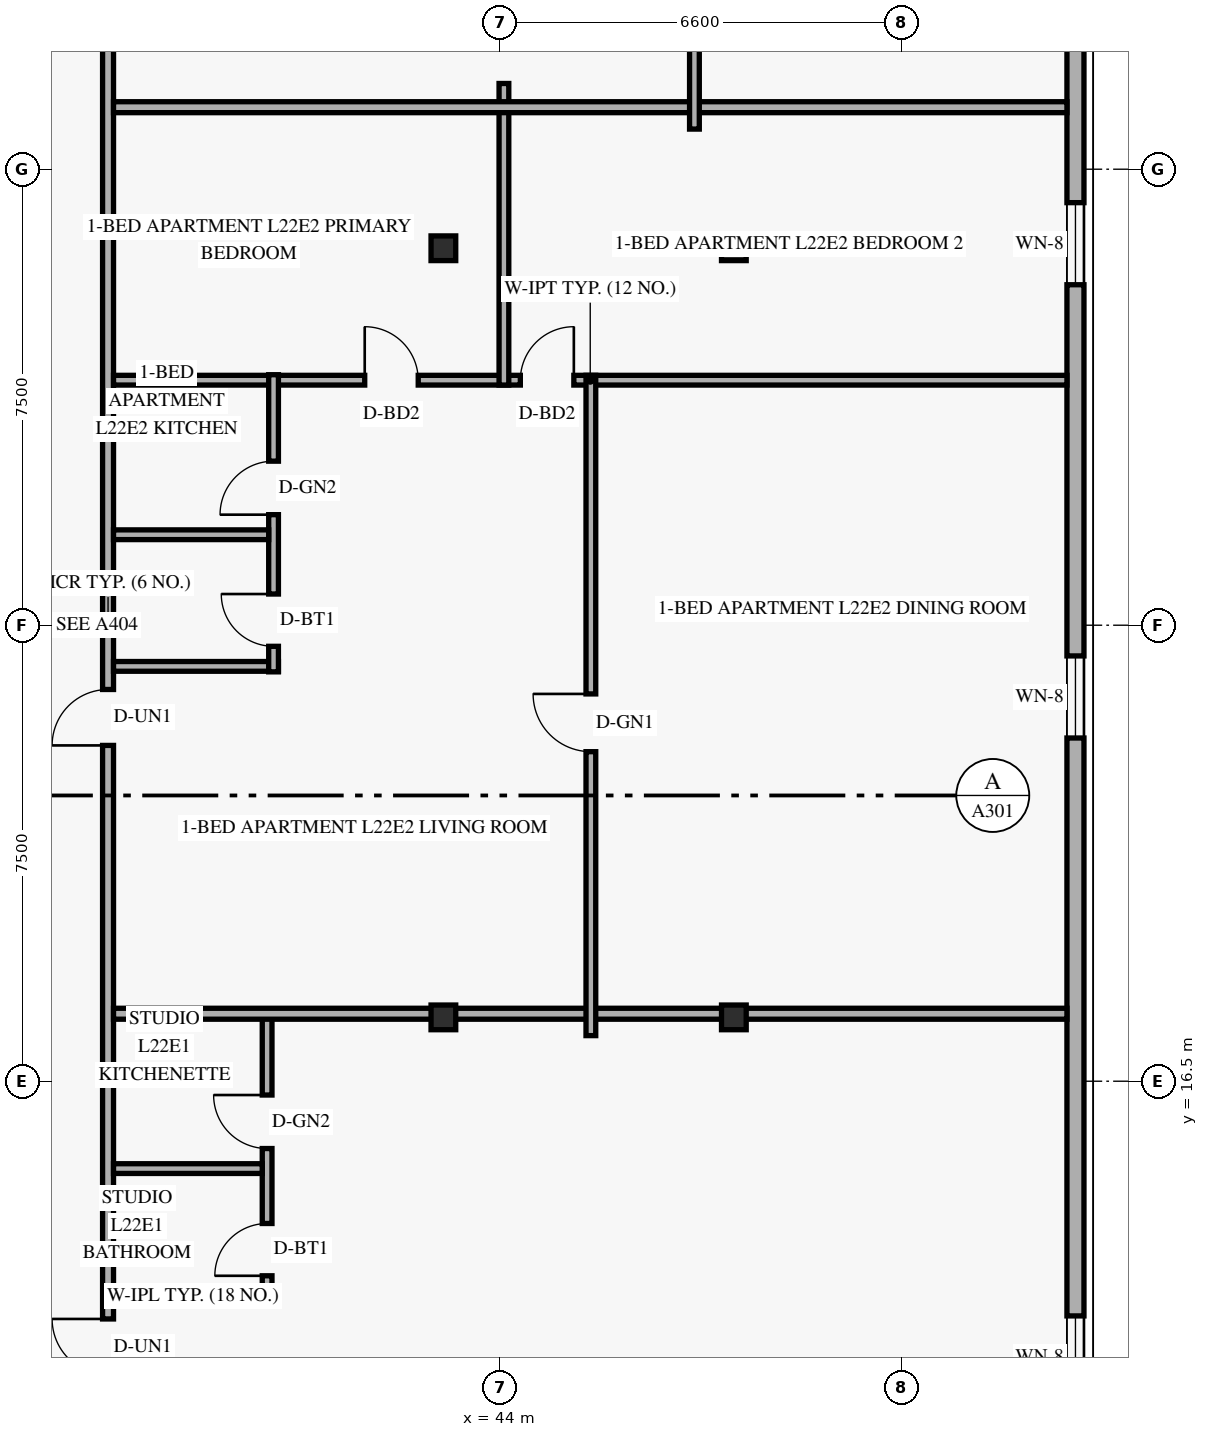
"""IFC4 building model, lengths in metres.
Left out: names, types, materials, properties, quantities, classifications, styles, units other than length and angle.
Written with IfcOpenShell. Run it as: python <this file> out.ifc"""

import sys

from ifc_helpers import new_model, si_unit, direction, frame, frame_2d, origin, origin_2d, place, context, subcontext, project, spatial, rectangle, hollow_rectangle, extrude, element, fill, save


model = new_model("IFC4")
c1 = context("Model", 3, precision=1e-05, world=origin(), true_north=direction((0.0, 1.0)))
c2 = subcontext(c1, "Body", "Model", "MODEL_VIEW")
j1 = project(units=[si_unit("LENGTHUNIT", "METRE"), si_unit("PLANEANGLEUNIT", "RADIAN")], contexts=[c1])
p1 = place(None, origin())
s1 = spatial("IfcSite", under=j1, at=p1, CompositionType="ELEMENT")
p2 = place(p1, origin())
s2 = spatial("IfcBuilding", under=s1, at=p2, CompositionType="ELEMENT")
p3 = place(p2, frame((0.0, 0.0, 87.6)))
s3 = spatial("IfcBuildingStorey", under=s2, at=p3, CompositionType="ELEMENT", Elevation=87.6)
for number, where, z_axis, x_axis in (
    (1, (43.002, 17.55, 0.0), (0.035, 0.0, 0.999), (0.0, 1.0, 0.0)),
    (2, (43.002, 30.2, 0.0), (0.035, 0.0, 0.999), (0.0, 1.0, 0.0)),
):
    element("IfcColumn", number, at=place(p3, frame(where, z_axis=z_axis, x_axis=x_axis)), inside=s3, PredefinedType="COLUMN", context=c2, shape_type="SweptSolid", body=[
        extrude(hollow_rectangle(XDim=0.406, YDim=0.406, WallThickness=0.016, at=origin_2d()), origin(), (0.0, 0.0, 1.0), 3.602),
    ])
for number, where, z_axis, x_axis in (
    (3, (47.738, 17.55, 0.0), (0.058, 0.0, 0.998), (0.0, 1.0, 0.0)),
    (4, (47.738, 30.2, 0.0), (0.058, 0.0, 0.998), (0.0, 1.0, 0.0)),
):
    element("IfcColumn", number, at=place(p3, frame(where, z_axis=z_axis, x_axis=x_axis)), inside=s3, PredefinedType="COLUMN", context=c2, shape_type="SweptSolid", body=[
        extrude(hollow_rectangle(XDim=0.406, YDim=0.406, WallThickness=0.016, at=origin_2d()), origin(), (0.0, 0.0, 1.0), 3.606),
    ])
p4 = place(p3, frame((53.46, 6.32, 0.0), z_axis=(0.0, 0.0, 1.0), x_axis=(0.0, 1.0, 0.0)))
e5 = element("IfcWall", 5, at=p4, inside=s3, PredefinedType="SOLIDWALL", context=c2, shape_type="SweptSolid", body=[
    extrude(rectangle(XDim=35.36, YDim=0.28, at=frame_2d((17.68, 0.0))), origin(), (0.0, 0.0, 1.0), 3.36),
])
p5 = place(p4, frame((4.97, 0.0, 0.85)))
e6 = element("IfcOpeningElement", 6, at=p5, cuts=e5, PredefinedType="OPENING", context=c2, shape_type="SweptSolid", body=[
    extrude(rectangle(XDim=1.35, YDim=1.55, at=frame_2d((0.675, 0.775))), frame((0.0, 0.15, 0.0), z_axis=(0.0, -1.0, 0.0), x_axis=(1.0, 0.0, 0.0)), (0.0, 0.0, 1.0), 0.3),
])
p6 = place(p4, frame((15.825, 0.0, 0.85)))
e7 = element("IfcOpeningElement", 7, at=p6, cuts=e5, PredefinedType="OPENING", context=c2, shape_type="SweptSolid", body=[
    extrude(rectangle(XDim=1.35, YDim=1.55, at=frame_2d((0.675, 0.775))), frame((0.0, 0.15, 0.0), z_axis=(0.0, -1.0, 0.0), x_axis=(1.0, 0.0, 0.0)), (0.0, 0.0, 1.0), 0.3),
])
p7 = place(p4, frame((23.28, 0.0, 0.85)))
e8 = element("IfcOpeningElement", 8, at=p7, cuts=e5, PredefinedType="OPENING", context=c2, shape_type="SweptSolid", body=[
    extrude(rectangle(XDim=1.35, YDim=1.55, at=frame_2d((0.675, 0.775))), frame((0.0, 0.15, 0.0), z_axis=(0.0, -1.0, 0.0), x_axis=(1.0, 0.0, 0.0)), (0.0, 0.0, 1.0), 0.3),
])
p8 = place(p4, frame((29.845, 0.0, 0.85)))
e9 = element("IfcOpeningElement", 9, at=p8, cuts=e5, PredefinedType="OPENING", context=c2, shape_type="SweptSolid", body=[
    extrude(rectangle(XDim=1.35, YDim=1.55, at=frame_2d((0.675, 0.775))), frame((0.0, 0.15, 0.0), z_axis=(0.0, -1.0, 0.0), x_axis=(1.0, 0.0, 0.0)), (0.0, 0.0, 1.0), 0.3),
])
p9 = place(p3, frame((37.55, 2.98, 0.0), z_axis=(0.0, 0.0, 1.0), x_axis=(0.0, 1.0, 0.0)))
e10 = element("IfcWall", 10, at=p9, inside=s3, PredefinedType="STANDARD", context=c2, shape_type="SweptSolid", body=[
    extrude(rectangle(XDim=42.04, YDim=0.18, at=frame_2d((21.02, 0.0))), origin(), (0.0, 0.0, 1.0), 2.731),
])
p10 = place(p9, frame((8.69, 0.0, 0.0)))
e11 = element("IfcOpeningElement", 11, at=p10, cuts=e10, PredefinedType="OPENING", context=c2, shape_type="SweptSolid", body=[
    extrude(rectangle(XDim=0.92, YDim=2.15, at=frame_2d((0.46, 1.075))), frame((0.0, 0.1, 0.0), z_axis=(0.0, -1.0, 0.0), x_axis=(1.0, 0.0, 0.0)), (0.0, 0.0, 1.0), 0.2),
])
p11 = place(p9, frame((19.043, 0.0, 0.0)))
e12 = element("IfcOpeningElement", 12, at=p11, cuts=e10, PredefinedType="OPENING", context=c2, shape_type="SweptSolid", body=[
    extrude(rectangle(XDim=0.92, YDim=2.15, at=frame_2d((0.46, 1.075))), frame((0.0, 0.1, 0.0), z_axis=(0.0, -1.0, 0.0), x_axis=(1.0, 0.0, 0.0)), (0.0, 0.0, 1.0), 0.2),
])
p12 = place(p9, frame((32.145, 0.0, 0.0)))
e13 = element("IfcOpeningElement", 13, at=p12, cuts=e10, PredefinedType="OPENING", context=c2, shape_type="SweptSolid", body=[
    extrude(rectangle(XDim=0.92, YDim=2.15, at=frame_2d((0.46, 1.075))), frame((0.0, 0.1, 0.0), z_axis=(0.0, -1.0, 0.0), x_axis=(1.0, 0.0, 0.0)), (0.0, 0.0, 1.0), 0.2),
])
p13 = place(p3, frame((37.64, 12.97, 0.0), z_axis=(0.0, 0.0, 1.0), x_axis=(1.0, 0.0, 0.0)))
e14 = element("IfcWall", 14, at=p13, inside=s3, PredefinedType="PLUMBINGWALL", context=c2, shape_type="SweptSolid", body=[
    extrude(rectangle(XDim=2.606, YDim=0.16, at=frame_2d((1.303, 0.0))), origin(), (0.0, 0.0, 1.0), 3.36),
])
p14 = place(p3, frame((40.166, 12.88, 0.0), z_axis=(0.0, 0.0, 1.0), x_axis=(0.0, 1.0, 0.0)))
e15 = element("IfcWall", 15, at=p14, inside=s3, PredefinedType="PLUMBINGWALL", context=c2, shape_type="SweptSolid", body=[
    extrude(rectangle(XDim=4.73, YDim=0.16, at=frame_2d((2.365, 0.0))), origin(), (0.0, 0.0, 1.0), 2.731),
])
p15 = place(p14, frame((0.42, 0.0, 0.0)))
e16 = element("IfcOpeningElement", 16, at=p15, cuts=e15, PredefinedType="OPENING", context=c2, shape_type="SweptSolid", body=[
    extrude(rectangle(XDim=0.86, YDim=2.12, at=frame_2d((0.43, 1.06))), frame((0.0, 0.09, 0.0), z_axis=(0.0, -1.0, 0.0), x_axis=(1.0, 0.0, 0.0)), (0.0, 0.0, 1.0), 0.18),
])
p16 = place(p14, frame((2.513, 0.0, 0.0)))
e17 = element("IfcOpeningElement", 17, at=p16, cuts=e15, PredefinedType="OPENING", context=c2, shape_type="SweptSolid", body=[
    extrude(rectangle(XDim=0.88, YDim=2.12, at=frame_2d((0.44, 1.06))), frame((0.0, 0.09, 0.0), z_axis=(0.0, -1.0, 0.0), x_axis=(1.0, 0.0, 0.0)), (0.0, 0.0, 1.0), 0.18),
])
p17 = place(p3, frame((37.64, 15.063, 0.0), z_axis=(0.0, 0.0, 1.0), x_axis=(1.0, 0.0, 0.0)))
e18 = element("IfcWall", 18, at=p17, inside=s3, PredefinedType="PLUMBINGWALL", context=c2, shape_type="SweptSolid", body=[
    extrude(rectangle(XDim=2.446, YDim=0.16, at=frame_2d((1.223, 0.0))), origin(), (0.0, 0.0, 1.0), 3.36),
])
p18 = place(p3, frame((37.64, 17.61, 0.0), z_axis=(0.0, 0.0, 1.0), x_axis=(1.0, 0.0, 0.0)))
e19 = element("IfcWall", 19, at=p18, inside=s3, PredefinedType="PARTITIONING", context=c2, shape_type="SweptSolid", body=[
    extrude(rectangle(XDim=15.68, YDim=0.18, at=frame_2d((7.84, 0.0))), origin(), (0.0, 0.0, 1.0), 2.731),
])
p19 = place(p3, frame((37.64, 28.03, 0.0), z_axis=(0.0, 0.0, 1.0), x_axis=(1.0, 0.0, 0.0)))
e20 = element("IfcWall", 20, at=p19, inside=s3, PredefinedType="PARTITIONING", context=c2, shape_type="SweptSolid", body=[
    extrude(rectangle(XDim=15.68, YDim=0.16, at=frame_2d((7.84, 0.0))), origin(), (0.0, 0.0, 1.0), 2.731),
])
p20 = place(p19, frame((4.131, 0.0, 0.0)))
e21 = element("IfcOpeningElement", 21, at=p20, cuts=e20, PredefinedType="OPENING", context=c2, shape_type="SweptSolid", body=[
    extrude(rectangle(XDim=0.88, YDim=2.14, at=frame_2d((0.44, 1.07))), frame((0.0, 0.09, 0.0), z_axis=(0.0, -1.0, 0.0), x_axis=(1.0, 0.0, 0.0)), (0.0, 0.0, 1.0), 0.18),
])
p21 = place(p19, frame((6.69, 0.0, 0.0)))
e22 = element("IfcOpeningElement", 22, at=p21, cuts=e20, PredefinedType="OPENING", context=c2, shape_type="SweptSolid", body=[
    extrude(rectangle(XDim=0.88, YDim=2.14, at=frame_2d((0.44, 1.07))), frame((0.0, 0.09, 0.0), z_axis=(0.0, -1.0, 0.0), x_axis=(1.0, 0.0, 0.0)), (0.0, 0.0, 1.0), 0.18),
])
p22 = place(p3, frame((37.64, 23.323, 0.0), z_axis=(0.0, 0.0, 1.0), x_axis=(1.0, 0.0, 0.0)))
e23 = element("IfcWall", 23, at=p22, inside=s3, PredefinedType="PLUMBINGWALL", context=c2, shape_type="SweptSolid", body=[
    extrude(rectangle(XDim=2.712, YDim=0.16, at=frame_2d((1.356, 0.0))), origin(), (0.0, 0.0, 1.0), 3.36),
])
p23 = place(p3, frame((40.272, 23.233, 0.0), z_axis=(0.0, 0.0, 1.0), x_axis=(0.0, 1.0, 0.0)))
e24 = element("IfcWall", 24, at=p23, inside=s3, PredefinedType="PLUMBINGWALL", context=c2, shape_type="SweptSolid", body=[
    extrude(rectangle(XDim=4.887, YDim=0.16, at=frame_2d((2.444, 0.0))), origin(), (0.0, 0.0, 1.0), 3.36),
])
p24 = place(p23, frame((0.42, 0.0, 0.0)))
e25 = element("IfcOpeningElement", 25, at=p24, cuts=e24, PredefinedType="OPENING", context=c2, shape_type="SweptSolid", body=[
    extrude(rectangle(XDim=0.86, YDim=2.12, at=frame_2d((0.43, 1.06))), frame((0.0, 0.09, 0.0), z_axis=(0.0, -1.0, 0.0), x_axis=(1.0, 0.0, 0.0)), (0.0, 0.0, 1.0), 0.18),
])
p25 = place(p23, frame((2.585, 0.0, 0.0)))
e26 = element("IfcOpeningElement", 26, at=p25, cuts=e24, PredefinedType="OPENING", context=c2, shape_type="SweptSolid", body=[
    extrude(rectangle(XDim=0.88, YDim=2.12, at=frame_2d((0.44, 1.06))), frame((0.0, 0.09, 0.0), z_axis=(0.0, -1.0, 0.0), x_axis=(1.0, 0.0, 0.0)), (0.0, 0.0, 1.0), 0.18),
])
p26 = place(p3, frame((37.64, 25.488, 0.0), z_axis=(0.0, 0.0, 1.0), x_axis=(1.0, 0.0, 0.0)))
e27 = element("IfcWall", 27, at=p26, inside=s3, PredefinedType="PLUMBINGWALL", context=c2, shape_type="SweptSolid", body=[
    extrude(rectangle(XDim=2.552, YDim=0.16, at=frame_2d((1.276, 0.0))), origin(), (0.0, 0.0, 1.0), 3.36),
])
p27 = place(p3, frame((45.49, 17.25, 0.0), z_axis=(0.0, 0.0, 1.0), x_axis=(0.0, 1.0, 0.0)))
e28 = element("IfcWall", 28, at=p27, inside=s3, PredefinedType="PARTITIONING", context=c2, shape_type="SweptSolid", body=[
    extrude(rectangle(XDim=10.86, YDim=0.16, at=frame_2d((5.43, 0.0))), origin(), (0.0, 0.0, 1.0), 2.731),
])
p28 = place(p27, frame((4.67, 0.0, 0.0)))
e29 = element("IfcOpeningElement", 29, at=p28, cuts=e28, PredefinedType="OPENING", context=c2, shape_type="SweptSolid", body=[
    extrude(rectangle(XDim=0.95, YDim=2.15, at=frame_2d((0.475, 1.075))), frame((0.0, 0.09, 0.0), z_axis=(0.0, -1.0, 0.0), x_axis=(1.0, 0.0, 0.0)), (0.0, 0.0, 1.0), 0.18),
])
p29 = place(p3, frame((44.061, 27.95, 0.0), z_axis=(0.0, 0.0, 1.0), x_axis=(0.0, 1.0, 0.0)))
e30 = element("IfcWall", 30, at=p29, inside=s3, PredefinedType="PARTITIONING", context=c2, shape_type="SweptSolid", body=[
    extrude(rectangle(XDim=4.96, YDim=0.16, at=frame_2d((2.48, 0.0))), origin(), (0.0, 0.0, 1.0), 2.731),
])
p30 = place(p3, frame((37.64, 32.52, 0.0), z_axis=(0.0, 0.0, 1.0), x_axis=(1.0, 0.0, 0.0)))
e31 = element("IfcWall", 31, at=p30, inside=s3, PredefinedType="PARTITIONING", context=c2, shape_type="SweptSolid", body=[
    extrude(rectangle(XDim=15.68, YDim=0.18, at=frame_2d((7.84, 0.0))), origin(), (0.0, 0.0, 1.0), 2.731),
])
p31 = place(p3, frame((47.194, 32.16, 0.0), z_axis=(0.0, 0.0, 1.0), x_axis=(0.0, 1.0, 0.0)))
e32 = element("IfcWall", 32, at=p31, inside=s3, PredefinedType="PARTITIONING", context=c2, shape_type="SweptSolid", body=[
    extrude(rectangle(XDim=9.08, YDim=0.16, at=frame_2d((4.54, 0.0))), origin(), (0.0, 0.0, 1.0), 2.731),
])
p32 = place(p31, frame((3.78, 0.0, 0.0)))
e33 = element("IfcOpeningElement", 33, at=p32, cuts=e32, PredefinedType="OPENING", context=c2, shape_type="SweptSolid", body=[
    extrude(rectangle(XDim=0.95, YDim=2.15, at=frame_2d((0.475, 1.075))), frame((0.0, 0.09, 0.0), z_axis=(0.0, -1.0, 0.0), x_axis=(1.0, 0.0, 0.0)), (0.0, 0.0, 1.0), 0.18),
])
p33 = place(p5, origin())
e34 = element("IfcWindow", 34, at=p33, inside=s3, PartitioningType="SINGLE_PANEL", PredefinedType="WINDOW", context=c2, shape_type="SweptSolid", body=[
    extrude(rectangle(XDim=1.35, YDim=1.55, at=frame_2d((0.675, 0.775))), frame((0.0, 0.03, 0.0), z_axis=(0.0, -1.0, 0.0), x_axis=(1.0, 0.0, 0.0)), (0.0, 0.0, 1.0), 0.06),
])
fill(e6, e34)
p34 = place(p6, origin())
e35 = element("IfcWindow", 35, at=p34, inside=s3, PartitioningType="SINGLE_PANEL", PredefinedType="WINDOW", context=c2, shape_type="SweptSolid", body=[
    extrude(rectangle(XDim=1.35, YDim=1.55, at=frame_2d((0.675, 0.775))), frame((0.0, 0.03, 0.0), z_axis=(0.0, -1.0, 0.0), x_axis=(1.0, 0.0, 0.0)), (0.0, 0.0, 1.0), 0.06),
])
fill(e7, e35)
p35 = place(p7, origin())
e36 = element("IfcWindow", 36, at=p35, inside=s3, PartitioningType="SINGLE_PANEL", PredefinedType="WINDOW", context=c2, shape_type="SweptSolid", body=[
    extrude(rectangle(XDim=1.35, YDim=1.55, at=frame_2d((0.675, 0.775))), frame((0.0, 0.03, 0.0), z_axis=(0.0, -1.0, 0.0), x_axis=(1.0, 0.0, 0.0)), (0.0, 0.0, 1.0), 0.06),
])
fill(e8, e36)
p36 = place(p10, origin())
e37 = element("IfcDoor", 37, at=p36, inside=s3, OperationType="SINGLE_SWING_RIGHT", PredefinedType="DOOR", context=c2, shape_type="SweptSolid", body=[
    extrude(rectangle(XDim=0.92, YDim=2.15, at=frame_2d((0.46, 1.075))), frame((0.0, 0.025, 0.0), z_axis=(0.0, -1.0, 0.0), x_axis=(1.0, 0.0, 0.0)), (0.0, 0.0, 1.0), 0.05),
])
fill(e11, e37)
p37 = place(p15, origin())
e38 = element("IfcDoor", 38, at=p37, inside=s3, OperationType="SINGLE_SWING_LEFT", PredefinedType="DOOR", context=c2, shape_type="SweptSolid", body=[
    extrude(rectangle(XDim=0.86, YDim=2.12, at=frame_2d((0.43, 1.06))), frame((0.0, 0.025, 0.0), z_axis=(0.0, -1.0, 0.0), x_axis=(1.0, 0.0, 0.0)), (0.0, 0.0, 1.0), 0.05),
])
fill(e16, e38)
p38 = place(p16, origin())
e39 = element("IfcDoor", 39, at=p38, inside=s3, OperationType="SINGLE_SWING_RIGHT", PredefinedType="DOOR", context=c2, shape_type="SweptSolid", body=[
    extrude(rectangle(XDim=0.88, YDim=2.12, at=frame_2d((0.44, 1.06))), frame((0.0, 0.025, 0.0), z_axis=(0.0, -1.0, 0.0), x_axis=(1.0, 0.0, 0.0)), (0.0, 0.0, 1.0), 0.05),
])
fill(e17, e39)
p39 = place(p28, origin())
e40 = element("IfcDoor", 40, at=p39, inside=s3, OperationType="SINGLE_SWING_RIGHT", PredefinedType="DOOR", context=c2, shape_type="SweptSolid", body=[
    extrude(rectangle(XDim=0.95, YDim=2.15, at=frame_2d((0.475, 1.075))), frame((0.0, 0.025, 0.0), z_axis=(0.0, -1.0, 0.0), x_axis=(1.0, 0.0, 0.0)), (0.0, 0.0, 1.0), 0.05),
])
fill(e29, e40)
p40 = place(p11, origin())
e41 = element("IfcDoor", 41, at=p40, inside=s3, OperationType="SINGLE_SWING_LEFT", PredefinedType="DOOR", context=c2, shape_type="SweptSolid", body=[
    extrude(rectangle(XDim=0.92, YDim=2.15, at=frame_2d((0.46, 1.075))), frame((0.0, 0.025, 0.0), z_axis=(0.0, -1.0, 0.0), x_axis=(1.0, 0.0, 0.0)), (0.0, 0.0, 1.0), 0.05),
])
fill(e12, e41)
p41 = place(p24, origin())
e42 = element("IfcDoor", 42, at=p41, inside=s3, OperationType="SINGLE_SWING_RIGHT", PredefinedType="DOOR", context=c2, shape_type="SweptSolid", body=[
    extrude(rectangle(XDim=0.86, YDim=2.12, at=frame_2d((0.43, 1.06))), frame((0.0, 0.025, 0.0), z_axis=(0.0, -1.0, 0.0), x_axis=(1.0, 0.0, 0.0)), (0.0, 0.0, 1.0), 0.05),
])
fill(e25, e42)
p42 = place(p25, origin())
e43 = element("IfcDoor", 43, at=p42, inside=s3, OperationType="SINGLE_SWING_LEFT", PredefinedType="DOOR", context=c2, shape_type="SweptSolid", body=[
    extrude(rectangle(XDim=0.88, YDim=2.12, at=frame_2d((0.44, 1.06))), frame((0.0, 0.025, 0.0), z_axis=(0.0, -1.0, 0.0), x_axis=(1.0, 0.0, 0.0)), (0.0, 0.0, 1.0), 0.05),
])
fill(e26, e43)
p43 = place(p20, origin())
e44 = element("IfcDoor", 44, at=p43, inside=s3, OperationType="SINGLE_SWING_LEFT", PredefinedType="DOOR", context=c2, shape_type="SweptSolid", body=[
    extrude(rectangle(XDim=0.88, YDim=2.14, at=frame_2d((0.44, 1.07))), frame((0.0, 0.025, 0.0), z_axis=(0.0, -1.0, 0.0), x_axis=(1.0, 0.0, 0.0)), (0.0, 0.0, 1.0), 0.05),
])
fill(e21, e44)
p44 = place(p21, origin())
e45 = element("IfcDoor", 45, at=p44, inside=s3, OperationType="SINGLE_SWING_RIGHT", PredefinedType="DOOR", context=c2, shape_type="SweptSolid", body=[
    extrude(rectangle(XDim=0.88, YDim=2.14, at=frame_2d((0.44, 1.07))), frame((0.0, 0.025, 0.0), z_axis=(0.0, -1.0, 0.0), x_axis=(1.0, 0.0, 0.0)), (0.0, 0.0, 1.0), 0.05),
])
fill(e22, e45)
save(model, sys.argv[1])
